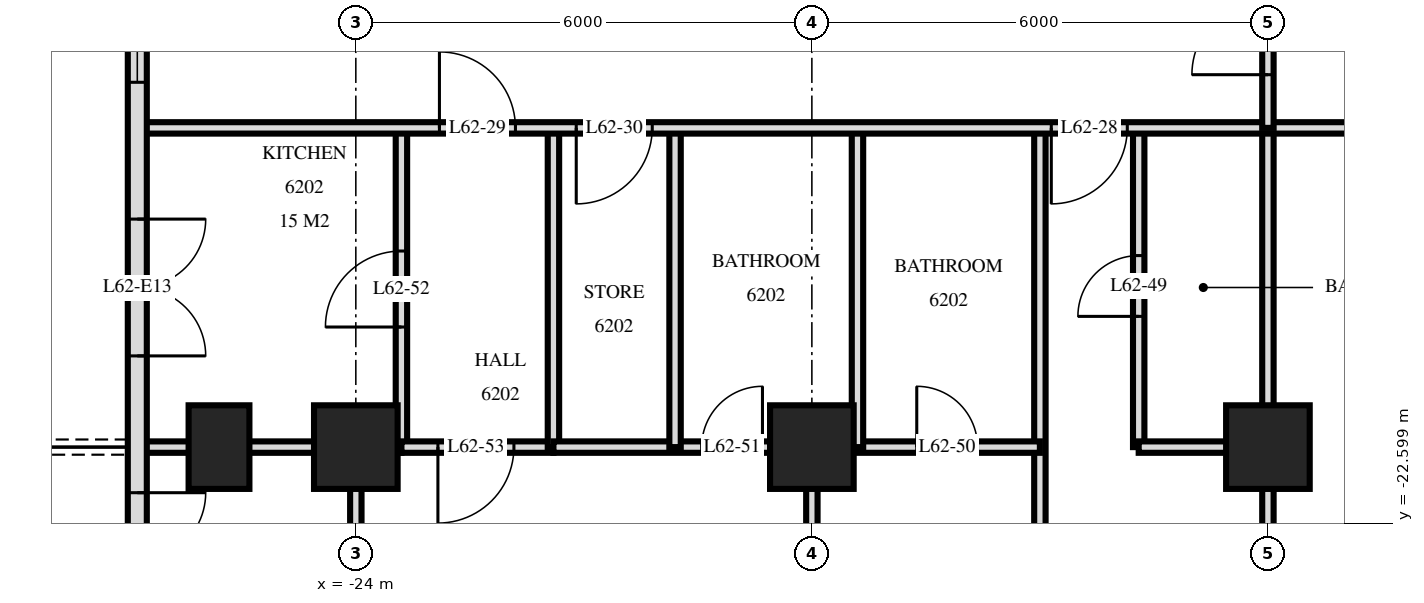
"""IFC4 building model, lengths in metres.
Left out: names, types, materials, properties, quantities, classifications, styles, units other than length and angle.
Written with IfcOpenShell. Run it as: python <this file> out.ifc"""

import sys

from ifc_helpers import new_model, si_unit, direction, frame, frame_2d, origin, origin_2d, place, context, subcontext, project, spatial, rectangle, extrude, element, fill, save


model = new_model("IFC4")
c1 = context("Model", 3, precision=1e-05, world=origin(), true_north=direction((0.0, 1.0)))
c2 = subcontext(c1, "Body", "Model", "MODEL_VIEW")
j1 = project(units=[si_unit("LENGTHUNIT", "METRE"), si_unit("PLANEANGLEUNIT", "RADIAN")], contexts=[c1])
p1 = place(None, origin())
s1 = spatial("IfcSite", under=j1, at=p1, CompositionType="ELEMENT")
p2 = place(p1, origin())
s2 = spatial("IfcBuilding", under=s1, at=p2, CompositionType="ELEMENT")
p3 = place(p2, frame((0.0, 0.0, 236.1)))
s3 = spatial("IfcBuildingStorey", under=s2, at=p3, CompositionType="ELEMENT", Elevation=236.1)
p4 = place(p3, frame((-25.8, -21.6, 0.0), z_axis=(0.0, 0.0, 1.0), x_axis=(0.0, 1.0, 0.0)))
e1 = element("IfcColumn", 1, at=p4, inside=s3, PredefinedType="COLUMN", context=c2, shape_type="SweptSolid", body=[
    extrude(rectangle(XDim=1.1, YDim=0.8, at=origin_2d()), origin(), (0.0, 0.0, 1.0), 3.5),
])
for number, where, z_axis, x_axis in (
    (2, (-24.0, -21.6, 0.0), (0.0, 0.0, 1.0), (1.0, 0.0, 0.0)),
    (3, (-18.0, -21.6, 0.0), (0.0, 0.0, 1.0), (1.0, 0.0, 0.0)),
    (4, (-12.0, -21.6, 0.0), (0.0, 0.0, 1.0), (1.0, 0.0, 0.0)),
):
    element("IfcColumn", number, at=place(p3, frame(where, z_axis=z_axis, x_axis=x_axis)), inside=s3, PredefinedType="COLUMN", context=c2, shape_type="SweptSolid", body=[
        extrude(rectangle(XDim=1.1, YDim=1.1, at=origin_2d()), origin(), (0.0, 0.0, 1.0), 3.5),
    ])
p5 = place(p3, frame((-26.875, -3.325, 0.0), z_axis=(0.0, 0.0, 1.0), x_axis=(0.0, -1.0, 0.0)))
e5 = element("IfcWall", 5, at=p5, inside=s3, PredefinedType="SOLIDWALL", context=c2, shape_type="SweptSolid", body=[
    extrude(rectangle(XDim=21.551, YDim=0.25, at=frame_2d((10.775, 0.0))), origin(), (0.0, 0.0, 1.0), 3.22),
])
p6 = place(p5, frame((7.525, 0.0, 0.0)))
e6 = element("IfcOpeningElement", 6, at=p6, cuts=e5, PredefinedType="OPENING", context=c2, shape_type="SweptSolid", body=[
    extrude(rectangle(XDim=1.8, YDim=2.4, at=frame_2d((0.9, 1.2))), frame((0.0, 0.135, 0.0), z_axis=(0.0, -1.0, 0.0), x_axis=(1.0, 0.0, 0.0)), (0.0, 0.0, 1.0), 0.27),
])
p7 = place(p5, frame((12.275, 0.0, 0.9)))
e7 = element("IfcOpeningElement", 7, at=p7, cuts=e5, PredefinedType="OPENING", context=c2, shape_type="SweptSolid", body=[
    extrude(rectangle(XDim=1.2, YDim=1.5, at=frame_2d((0.6, 0.75))), frame((0.0, 0.135, 0.0), z_axis=(0.0, -1.0, 0.0), x_axis=(1.0, 0.0, 0.0)), (0.0, 0.0, 1.0), 0.27),
])
p8 = place(p5, frame((15.275, 0.0, 0.0)))
e8 = element("IfcOpeningElement", 8, at=p8, cuts=e5, PredefinedType="OPENING", context=c2, shape_type="SweptSolid", body=[
    extrude(rectangle(XDim=1.8, YDim=2.4, at=frame_2d((0.9, 1.2))), frame((0.0, 0.135, 0.0), z_axis=(0.0, -1.0, 0.0), x_axis=(1.0, 0.0, 0.0)), (0.0, 0.0, 1.0), 0.27),
])
p9 = place(p5, frame((18.875, 0.0, 0.0)))
e9 = element("IfcOpeningElement", 9, at=p9, cuts=e5, PredefinedType="OPENING", context=c2, shape_type="SweptSolid", body=[
    extrude(rectangle(XDim=1.8, YDim=2.4, at=frame_2d((0.9, 1.2))), frame((0.0, 0.135, 0.0), z_axis=(0.0, -1.0, 0.0), x_axis=(1.0, 0.0, 0.0)), (0.0, 0.0, 1.0), 0.27),
])
p10 = place(p3, frame((-12.0, -17.4, 0.0), z_axis=(0.0, 0.0, 1.0), x_axis=(0.0, 1.0, 0.0)))
e10 = element("IfcWall", 10, at=p10, inside=s3, PredefinedType="PARTITIONING", context=c2, shape_type="SweptSolid", body=[
    extrude(rectangle(XDim=2.35, YDim=0.15, at=frame_2d((1.175, 0.0))), origin(), (0.0, 0.0, 1.0), 3.22),
])
p11 = place(p10, frame((0.7, 0.0, 0.0)))
e11 = element("IfcOpeningElement", 11, at=p11, cuts=e10, PredefinedType="OPENING", context=c2, shape_type="SweptSolid", body=[
    extrude(rectangle(XDim=1.0, YDim=2.1, at=frame_2d((0.5, 1.05))), frame((0.0, 0.085, 0.0), z_axis=(0.0, -1.0, 0.0), x_axis=(1.0, 0.0, 0.0)), (0.0, 0.0, 1.0), 0.17),
])
p12 = place(p3, frame((-12.0, -29.22, 0.0), z_axis=(0.0, 0.0, 1.0), x_axis=(0.0, 1.0, 0.0)))
e12 = element("IfcWall", 12, at=p12, inside=s3, PredefinedType="PARTITIONING", context=c2, shape_type="SweptSolid", body=[
    extrude(rectangle(XDim=11.82, YDim=0.15, at=frame_2d((5.91, 0.0))), origin(), (0.0, 0.0, 1.0), 3.22),
])
p13 = place(p3, frame((-13.7, -21.6, 0.0), z_axis=(0.0, 0.0, 1.0), x_axis=(0.0, 1.0, 0.0)))
e13 = element("IfcWall", 13, at=p13, inside=s3, PredefinedType="PARTITIONING", context=c2, shape_type="SweptSolid", body=[
    extrude(rectangle(XDim=4.2, YDim=0.15, at=frame_2d((2.1, 0.0))), origin(), (0.0, 0.0, 1.0), 3.22),
])
p14 = place(p13, frame((1.72, 0.0, 0.0)))
e14 = element("IfcOpeningElement", 14, at=p14, cuts=e13, PredefinedType="OPENING", context=c2, shape_type="SweptSolid", body=[
    extrude(rectangle(XDim=0.8, YDim=2.1, at=frame_2d((0.4, 1.05))), frame((0.0, 0.085, 0.0), z_axis=(0.0, -1.0, 0.0), x_axis=(1.0, 0.0, 0.0)), (0.0, 0.0, 1.0), 0.17),
])
p15 = place(p3, frame((-15.0, -29.22, 0.0), z_axis=(0.0, 0.0, 1.0), x_axis=(0.0, 1.0, 0.0)))
e15 = element("IfcWall", 15, at=p15, inside=s3, PredefinedType="PARTITIONING", context=c2, shape_type="SweptSolid", body=[
    extrude(rectangle(XDim=11.82, YDim=0.15, at=frame_2d((5.91, 0.0))), origin(), (0.0, 0.0, 1.0), 3.22),
])
p16 = place(p3, frame((-17.4, -21.6, 0.0), z_axis=(0.0, 0.0, 1.0), x_axis=(0.0, 1.0, 0.0)))
e16 = element("IfcWall", 16, at=p16, inside=s3, PredefinedType="PARTITIONING", context=c2, shape_type="SweptSolid", body=[
    extrude(rectangle(XDim=4.2, YDim=0.15, at=frame_2d((2.1, 0.0))), origin(), (0.0, 0.0, 1.0), 3.22),
])
p17 = place(p3, frame((-18.0, -29.22, 0.0), z_axis=(0.0, 0.0, 1.0), x_axis=(0.0, 1.0, 0.0)))
e17 = element("IfcWall", 17, at=p17, inside=s3, PredefinedType="PARTITIONING", context=c2, shape_type="SweptSolid", body=[
    extrude(rectangle(XDim=7.62, YDim=0.15, at=frame_2d((3.81, 0.0))), origin(), (0.0, 0.0, 1.0), 3.22),
])
p18 = place(p17, frame((3.25, 0.0, 0.0)))
e18 = element("IfcOpeningElement", 18, at=p18, cuts=e17, PredefinedType="OPENING", context=c2, shape_type="SweptSolid", body=[
    extrude(rectangle(XDim=0.9, YDim=2.1, at=frame_2d((0.45, 1.05))), frame((0.0, 0.085, 0.0), z_axis=(0.0, -1.0, 0.0), x_axis=(1.0, 0.0, 0.0)), (0.0, 0.0, 1.0), 0.17),
])
for number, where, z_axis, x_axis in (
    (19, (-19.8, -21.6, 0.0), (0.0, 0.0, 1.0), (0.0, 1.0, 0.0)),
    (20, (-21.4, -21.6, 0.0), (0.0, 0.0, 1.0), (0.0, 1.0, 0.0)),
):
    element("IfcWall", number, at=place(p3, frame(where, z_axis=z_axis, x_axis=x_axis)), inside=s3, PredefinedType="PARTITIONING", context=c2, shape_type="SweptSolid", body=[
        extrude(rectangle(XDim=4.2, YDim=0.15, at=frame_2d((2.1, 0.0))), origin(), (0.0, 0.0, 1.0), 3.22),
    ])
p19 = place(p3, frame((-23.4, -21.6, 0.0), z_axis=(0.0, 0.0, 1.0), x_axis=(0.0, 1.0, 0.0)))
e21 = element("IfcWall", 21, at=p19, inside=s3, PredefinedType="PARTITIONING", context=c2, shape_type="SweptSolid", body=[
    extrude(rectangle(XDim=4.2, YDim=0.15, at=frame_2d((2.1, 0.0))), origin(), (0.0, 0.0, 1.0), 3.22),
])
p20 = place(p19, frame((1.58, 0.0, 0.0)))
e22 = element("IfcOpeningElement", 22, at=p20, cuts=e21, PredefinedType="OPENING", context=c2, shape_type="SweptSolid", body=[
    extrude(rectangle(XDim=1.0, YDim=2.1, at=frame_2d((0.5, 1.05))), frame((0.0, 0.085, 0.0), z_axis=(0.0, -1.0, 0.0), x_axis=(1.0, 0.0, 0.0)), (0.0, 0.0, 1.0), 0.17),
])
p21 = place(p3, frame((-24.0, -28.918, 0.0), z_axis=(0.0, 0.0, 1.0), x_axis=(0.0, 1.0, 0.0)))
e23 = element("IfcWall", 23, at=p21, inside=s3, PredefinedType="PARTITIONING", context=c2, shape_type="SweptSolid", body=[
    extrude(rectangle(XDim=7.318, YDim=0.15, at=frame_2d((3.659, 0.0))), origin(), (0.0, 0.0, 1.0), 3.22),
])
p22 = place(p21, frame((3.136, 0.0, 0.0)))
e24 = element("IfcOpeningElement", 24, at=p22, cuts=e23, PredefinedType="OPENING", context=c2, shape_type="SweptSolid", body=[
    extrude(rectangle(XDim=0.9, YDim=2.1, at=frame_2d((0.45, 1.05))), frame((0.0, 0.085, 0.0), z_axis=(0.0, -1.0, 0.0), x_axis=(1.0, 0.0, 0.0)), (0.0, 0.0, 1.0), 0.17),
])
p23 = place(p3, frame((-23.4, -21.6, 0.0), z_axis=(0.0, 0.0, 1.0), x_axis=(1.0, 0.0, 0.0)))
e25 = element("IfcWall", 25, at=p23, inside=s3, PredefinedType="PARTITIONING", context=c2, shape_type="SweptSolid", body=[
    extrude(rectangle(XDim=2.0, YDim=0.15, at=frame_2d((1.0, 0.0))), origin(), (0.0, 0.0, 1.0), 3.22),
])
p24 = place(p23, frame((0.48, 0.0, 0.0)))
e26 = element("IfcOpeningElement", 26, at=p24, cuts=e25, PredefinedType="OPENING", context=c2, shape_type="SweptSolid", body=[
    extrude(rectangle(XDim=1.0, YDim=2.1, at=frame_2d((0.5, 1.05))), frame((0.0, 0.085, 0.0), z_axis=(0.0, -1.0, 0.0), x_axis=(1.0, 0.0, 0.0)), (0.0, 0.0, 1.0), 0.17),
])
p25 = place(p3, frame((-26.82, -21.6, 0.0), z_axis=(0.0, 0.0, 1.0), x_axis=(1.0, 0.0, 0.0)))
e27 = element("IfcWall", 27, at=p25, inside=s3, PredefinedType="PARTITIONING", context=c2, shape_type="SweptSolid", body=[
    extrude(rectangle(XDim=3.42, YDim=0.15, at=frame_2d((1.71, 0.0))), origin(), (0.0, 0.0, 1.0), 3.22),
])
p26 = place(p3, frame((-21.4, -21.6, 0.0), z_axis=(0.0, 0.0, 1.0), x_axis=(1.0, 0.0, 0.0)))
e28 = element("IfcWall", 28, at=p26, inside=s3, PredefinedType="PARTITIONING", context=c2, shape_type="SweptSolid", body=[
    extrude(rectangle(XDim=6.4, YDim=0.15, at=frame_2d((3.2, 0.0))), origin(), (0.0, 0.0, 1.0), 3.22),
])
p27 = place(p26, frame((4.78, 0.0, 0.0)))
e29 = element("IfcOpeningElement", 29, at=p27, cuts=e28, PredefinedType="OPENING", context=c2, shape_type="SweptSolid", body=[
    extrude(rectangle(XDim=0.8, YDim=2.1, at=frame_2d((0.4, 1.05))), frame((0.0, 0.085, 0.0), z_axis=(0.0, -1.0, 0.0), x_axis=(1.0, 0.0, 0.0)), (0.0, 0.0, 1.0), 0.17),
])
p28 = place(p26, frame((1.95, 0.0, 0.0)))
e30 = element("IfcOpeningElement", 30, at=p28, cuts=e28, PredefinedType="OPENING", context=c2, shape_type="SweptSolid", body=[
    extrude(rectangle(XDim=0.8, YDim=2.1, at=frame_2d((0.4, 1.05))), frame((0.0, 0.085, 0.0), z_axis=(0.0, -1.0, 0.0), x_axis=(1.0, 0.0, 0.0)), (0.0, 0.0, 1.0), 0.17),
])
p29 = place(p3, frame((-13.7, -21.6, 0.0), z_axis=(0.0, 0.0, 1.0), x_axis=(1.0, 0.0, 0.0)))
e31 = element("IfcWall", 31, at=p29, inside=s3, PredefinedType="PARTITIONING", context=c2, shape_type="SweptSolid", body=[
    extrude(rectangle(XDim=1.7, YDim=0.15, at=frame_2d((0.85, 0.0))), origin(), (0.0, 0.0, 1.0), 3.22),
])
p30 = place(p3, frame((-26.82, -17.4, 0.0), z_axis=(0.0, 0.0, 1.0), x_axis=(1.0, 0.0, 0.0)))
e32 = element("IfcWall", 32, at=p30, inside=s3, PredefinedType="PARTITIONING", context=c2, shape_type="SweptSolid", body=[
    extrude(rectangle(XDim=53.64, YDim=0.15, at=frame_2d((26.82, 0.0))), origin(), (0.0, 0.0, 1.0), 3.22),
])
p31 = place(p30, frame((11.97, 0.0, 0.0)))
e33 = element("IfcOpeningElement", 33, at=p31, cuts=e32, PredefinedType="OPENING", context=c2, shape_type="SweptSolid", body=[
    extrude(rectangle(XDim=1.0, YDim=2.1, at=frame_2d((0.5, 1.05))), frame((0.0, 0.085, 0.0), z_axis=(0.0, -1.0, 0.0), x_axis=(1.0, 0.0, 0.0)), (0.0, 0.0, 1.0), 0.17),
])
p32 = place(p30, frame((3.92, 0.0, 0.0)))
e34 = element("IfcOpeningElement", 34, at=p32, cuts=e32, PredefinedType="OPENING", context=c2, shape_type="SweptSolid", body=[
    extrude(rectangle(XDim=1.0, YDim=2.1, at=frame_2d((0.5, 1.05))), frame((0.0, 0.085, 0.0), z_axis=(0.0, -1.0, 0.0), x_axis=(1.0, 0.0, 0.0)), (0.0, 0.0, 1.0), 0.17),
])
p33 = place(p30, frame((5.72, 0.0, 0.0)))
e35 = element("IfcOpeningElement", 35, at=p33, cuts=e32, PredefinedType="OPENING", context=c2, shape_type="SweptSolid", body=[
    extrude(rectangle(XDim=1.0, YDim=2.1, at=frame_2d((0.5, 1.05))), frame((0.0, 0.085, 0.0), z_axis=(0.0, -1.0, 0.0), x_axis=(1.0, 0.0, 0.0)), (0.0, 0.0, 1.0), 0.17),
])
p34 = place(p30, frame((47.72, 0.0, 0.0)))
e36 = element("IfcOpeningElement", 36, at=p34, cuts=e32, PredefinedType="OPENING", context=c2, shape_type="SweptSolid", body=[
    extrude(rectangle(XDim=1.0, YDim=2.1, at=frame_2d((0.5, 1.05))), frame((0.0, 0.085, 0.0), z_axis=(0.0, -1.0, 0.0), x_axis=(1.0, 0.0, 0.0)), (0.0, 0.0, 1.0), 0.17),
])
p35 = place(p30, frame((51.02, 0.0, 0.0)))
e37 = element("IfcOpeningElement", 37, at=p35, cuts=e32, PredefinedType="OPENING", context=c2, shape_type="SweptSolid", body=[
    extrude(rectangle(XDim=1.0, YDim=2.1, at=frame_2d((0.5, 1.05))), frame((0.0, 0.085, 0.0), z_axis=(0.0, -1.0, 0.0), x_axis=(1.0, 0.0, 0.0)), (0.0, 0.0, 1.0), 0.17),
])
p36 = place(p30, frame((17.32, 0.0, 0.0)))
e38 = element("IfcOpeningElement", 38, at=p36, cuts=e32, PredefinedType="OPENING", context=c2, shape_type="SweptSolid", body=[
    extrude(rectangle(XDim=1.0, YDim=2.1, at=frame_2d((0.5, 1.05))), frame((0.0, 0.085, 0.0), z_axis=(0.0, -1.0, 0.0), x_axis=(1.0, 0.0, 0.0)), (0.0, 0.0, 1.0), 0.17),
])
p37 = place(p30, frame((23.32, 0.0, 0.0)))
e39 = element("IfcOpeningElement", 39, at=p37, cuts=e32, PredefinedType="OPENING", context=c2, shape_type="SweptSolid", body=[
    extrude(rectangle(XDim=1.0, YDim=2.1, at=frame_2d((0.5, 1.05))), frame((0.0, 0.085, 0.0), z_axis=(0.0, -1.0, 0.0), x_axis=(1.0, 0.0, 0.0)), (0.0, 0.0, 1.0), 0.17),
])
p38 = place(p30, frame((29.32, 0.0, 0.0)))
e40 = element("IfcOpeningElement", 40, at=p38, cuts=e32, PredefinedType="OPENING", context=c2, shape_type="SweptSolid", body=[
    extrude(rectangle(XDim=1.0, YDim=2.1, at=frame_2d((0.5, 1.05))), frame((0.0, 0.085, 0.0), z_axis=(0.0, -1.0, 0.0), x_axis=(1.0, 0.0, 0.0)), (0.0, 0.0, 1.0), 0.17),
])
p39 = place(p30, frame((35.32, 0.0, 0.0)))
e41 = element("IfcOpeningElement", 41, at=p39, cuts=e32, PredefinedType="OPENING", context=c2, shape_type="SweptSolid", body=[
    extrude(rectangle(XDim=1.0, YDim=2.1, at=frame_2d((0.5, 1.05))), frame((0.0, 0.085, 0.0), z_axis=(0.0, -1.0, 0.0), x_axis=(1.0, 0.0, 0.0)), (0.0, 0.0, 1.0), 0.17),
])
p40 = place(p7, origin())
e42 = element("IfcWindow", 42, at=p40, inside=s3, PartitioningType="SINGLE_PANEL", PredefinedType="WINDOW", context=c2, shape_type="SweptSolid", body=[
    extrude(rectangle(XDim=1.2, YDim=1.5, at=frame_2d((0.6, 0.75))), frame((0.0, 0.03, 0.0), z_axis=(0.0, -1.0, 0.0), x_axis=(1.0, 0.0, 0.0)), (0.0, 0.0, 1.0), 0.06),
])
fill(e7, e42)
p41 = place(p8, origin())
e43 = element("IfcDoor", 43, at=p41, inside=s3, OperationType="DOUBLE_DOOR_SINGLE_SWING", PredefinedType="DOOR", context=c2, shape_type="SweptSolid", body=[
    extrude(rectangle(XDim=1.8, YDim=2.4, at=frame_2d((0.9, 1.2))), frame((0.0, 0.025, 0.0), z_axis=(0.0, -1.0, 0.0), x_axis=(1.0, 0.0, 0.0)), (0.0, 0.0, 1.0), 0.05),
])
fill(e8, e43)
p42 = place(p9, origin())
e44 = element("IfcDoor", 44, at=p42, inside=s3, OperationType="DOUBLE_DOOR_SINGLE_SWING", PredefinedType="DOOR", context=c2, shape_type="SweptSolid", body=[
    extrude(rectangle(XDim=1.8, YDim=2.4, at=frame_2d((0.9, 1.2))), frame((0.0, 0.025, 0.0), z_axis=(0.0, -1.0, 0.0), x_axis=(1.0, 0.0, 0.0)), (0.0, 0.0, 1.0), 0.05),
])
fill(e9, e44)
p43 = place(p11, origin())
e45 = element("IfcDoor", 45, at=p43, inside=s3, OperationType="SINGLE_SWING_RIGHT", PredefinedType="DOOR", context=c2, shape_type="SweptSolid", body=[
    extrude(rectangle(XDim=1.0, YDim=2.1, at=frame_2d((0.5, 1.05))), frame((0.0, 0.025, 0.0), z_axis=(0.0, -1.0, 0.0), x_axis=(1.0, 0.0, 0.0)), (0.0, 0.0, 1.0), 0.05),
])
fill(e11, e45)
p44 = place(p31, frame((0.5, 0.0, 0.0), z_axis=(0.0, 0.0, 1.0), x_axis=(-1.0, 0.0, 0.0)))
e46 = element("IfcDoor", 46, at=p44, inside=s3, OperationType="SINGLE_SWING_LEFT", PredefinedType="DOOR", context=c2, shape_type="SweptSolid", body=[
    extrude(rectangle(XDim=1.0, YDim=2.1, at=frame_2d((0.0, 1.05))), frame((0.0, -0.025, 0.0), z_axis=(0.0, 1.0, 0.0), x_axis=(-1.0, 0.0, 0.0)), (0.0, 0.0, 1.0), 0.05),
])
fill(e33, e46)
p45 = place(p32, origin())
e47 = element("IfcDoor", 47, at=p45, inside=s3, OperationType="SINGLE_SWING_RIGHT", PredefinedType="DOOR", context=c2, shape_type="SweptSolid", body=[
    extrude(rectangle(XDim=1.0, YDim=2.1, at=frame_2d((0.5, 1.05))), frame((0.0, 0.025, 0.0), z_axis=(0.0, -1.0, 0.0), x_axis=(1.0, 0.0, 0.0)), (0.0, 0.0, 1.0), 0.05),
])
fill(e34, e47)
p46 = place(p33, frame((0.5, 0.0, 0.0), z_axis=(0.0, 0.0, 1.0), x_axis=(-1.0, 0.0, 0.0)))
e48 = element("IfcDoor", 48, at=p46, inside=s3, OperationType="SINGLE_SWING_LEFT", PredefinedType="DOOR", context=c2, shape_type="SweptSolid", body=[
    extrude(rectangle(XDim=1.0, YDim=2.1, at=frame_2d((0.0, 1.05))), frame((0.0, -0.025, 0.0), z_axis=(0.0, 1.0, 0.0), x_axis=(-1.0, 0.0, 0.0)), (0.0, 0.0, 1.0), 0.05),
])
fill(e35, e48)
p47 = place(p14, origin())
e49 = element("IfcDoor", 49, at=p47, inside=s3, OperationType="SINGLE_SWING_RIGHT", PredefinedType="DOOR", context=c2, shape_type="SweptSolid", body=[
    extrude(rectangle(XDim=0.8, YDim=2.1, at=frame_2d((0.4, 1.05))), frame((0.0, 0.025, 0.0), z_axis=(0.0, -1.0, 0.0), x_axis=(1.0, 0.0, 0.0)), (0.0, 0.0, 1.0), 0.05),
])
fill(e14, e49)
p48 = place(p27, origin())
e50 = element("IfcDoor", 50, at=p48, inside=s3, OperationType="SINGLE_SWING_RIGHT", PredefinedType="DOOR", context=c2, shape_type="SweptSolid", body=[
    extrude(rectangle(XDim=0.8, YDim=2.1, at=frame_2d((0.4, 1.05))), frame((0.0, 0.025, 0.0), z_axis=(0.0, -1.0, 0.0), x_axis=(1.0, 0.0, 0.0)), (0.0, 0.0, 1.0), 0.05),
])
fill(e29, e50)
p49 = place(p28, origin())
e51 = element("IfcDoor", 51, at=p49, inside=s3, OperationType="SINGLE_SWING_LEFT", PredefinedType="DOOR", context=c2, shape_type="SweptSolid", body=[
    extrude(rectangle(XDim=0.8, YDim=2.1, at=frame_2d((0.4, 1.05))), frame((0.0, 0.025, 0.0), z_axis=(0.0, -1.0, 0.0), x_axis=(1.0, 0.0, 0.0)), (0.0, 0.0, 1.0), 0.05),
])
fill(e30, e51)
p50 = place(p20, origin())
e52 = element("IfcDoor", 52, at=p50, inside=s3, OperationType="SINGLE_SWING_RIGHT", PredefinedType="DOOR", context=c2, shape_type="SweptSolid", body=[
    extrude(rectangle(XDim=1.0, YDim=2.1, at=frame_2d((0.5, 1.05))), frame((0.0, 0.025, 0.0), z_axis=(0.0, -1.0, 0.0), x_axis=(1.0, 0.0, 0.0)), (0.0, 0.0, 1.0), 0.05),
])
fill(e22, e52)
p51 = place(p24, frame((0.5, 0.0, 0.0), z_axis=(0.0, 0.0, 1.0), x_axis=(-1.0, 0.0, 0.0)))
e53 = element("IfcDoor", 53, at=p51, inside=s3, OperationType="SINGLE_SWING_LEFT", PredefinedType="DOOR", context=c2, shape_type="SweptSolid", body=[
    extrude(rectangle(XDim=1.0, YDim=2.1, at=frame_2d((0.0, 1.05))), frame((0.0, -0.025, 0.0), z_axis=(0.0, 1.0, 0.0), x_axis=(-1.0, 0.0, 0.0)), (0.0, 0.0, 1.0), 0.05),
])
fill(e26, e53)
save(model, sys.argv[1])
